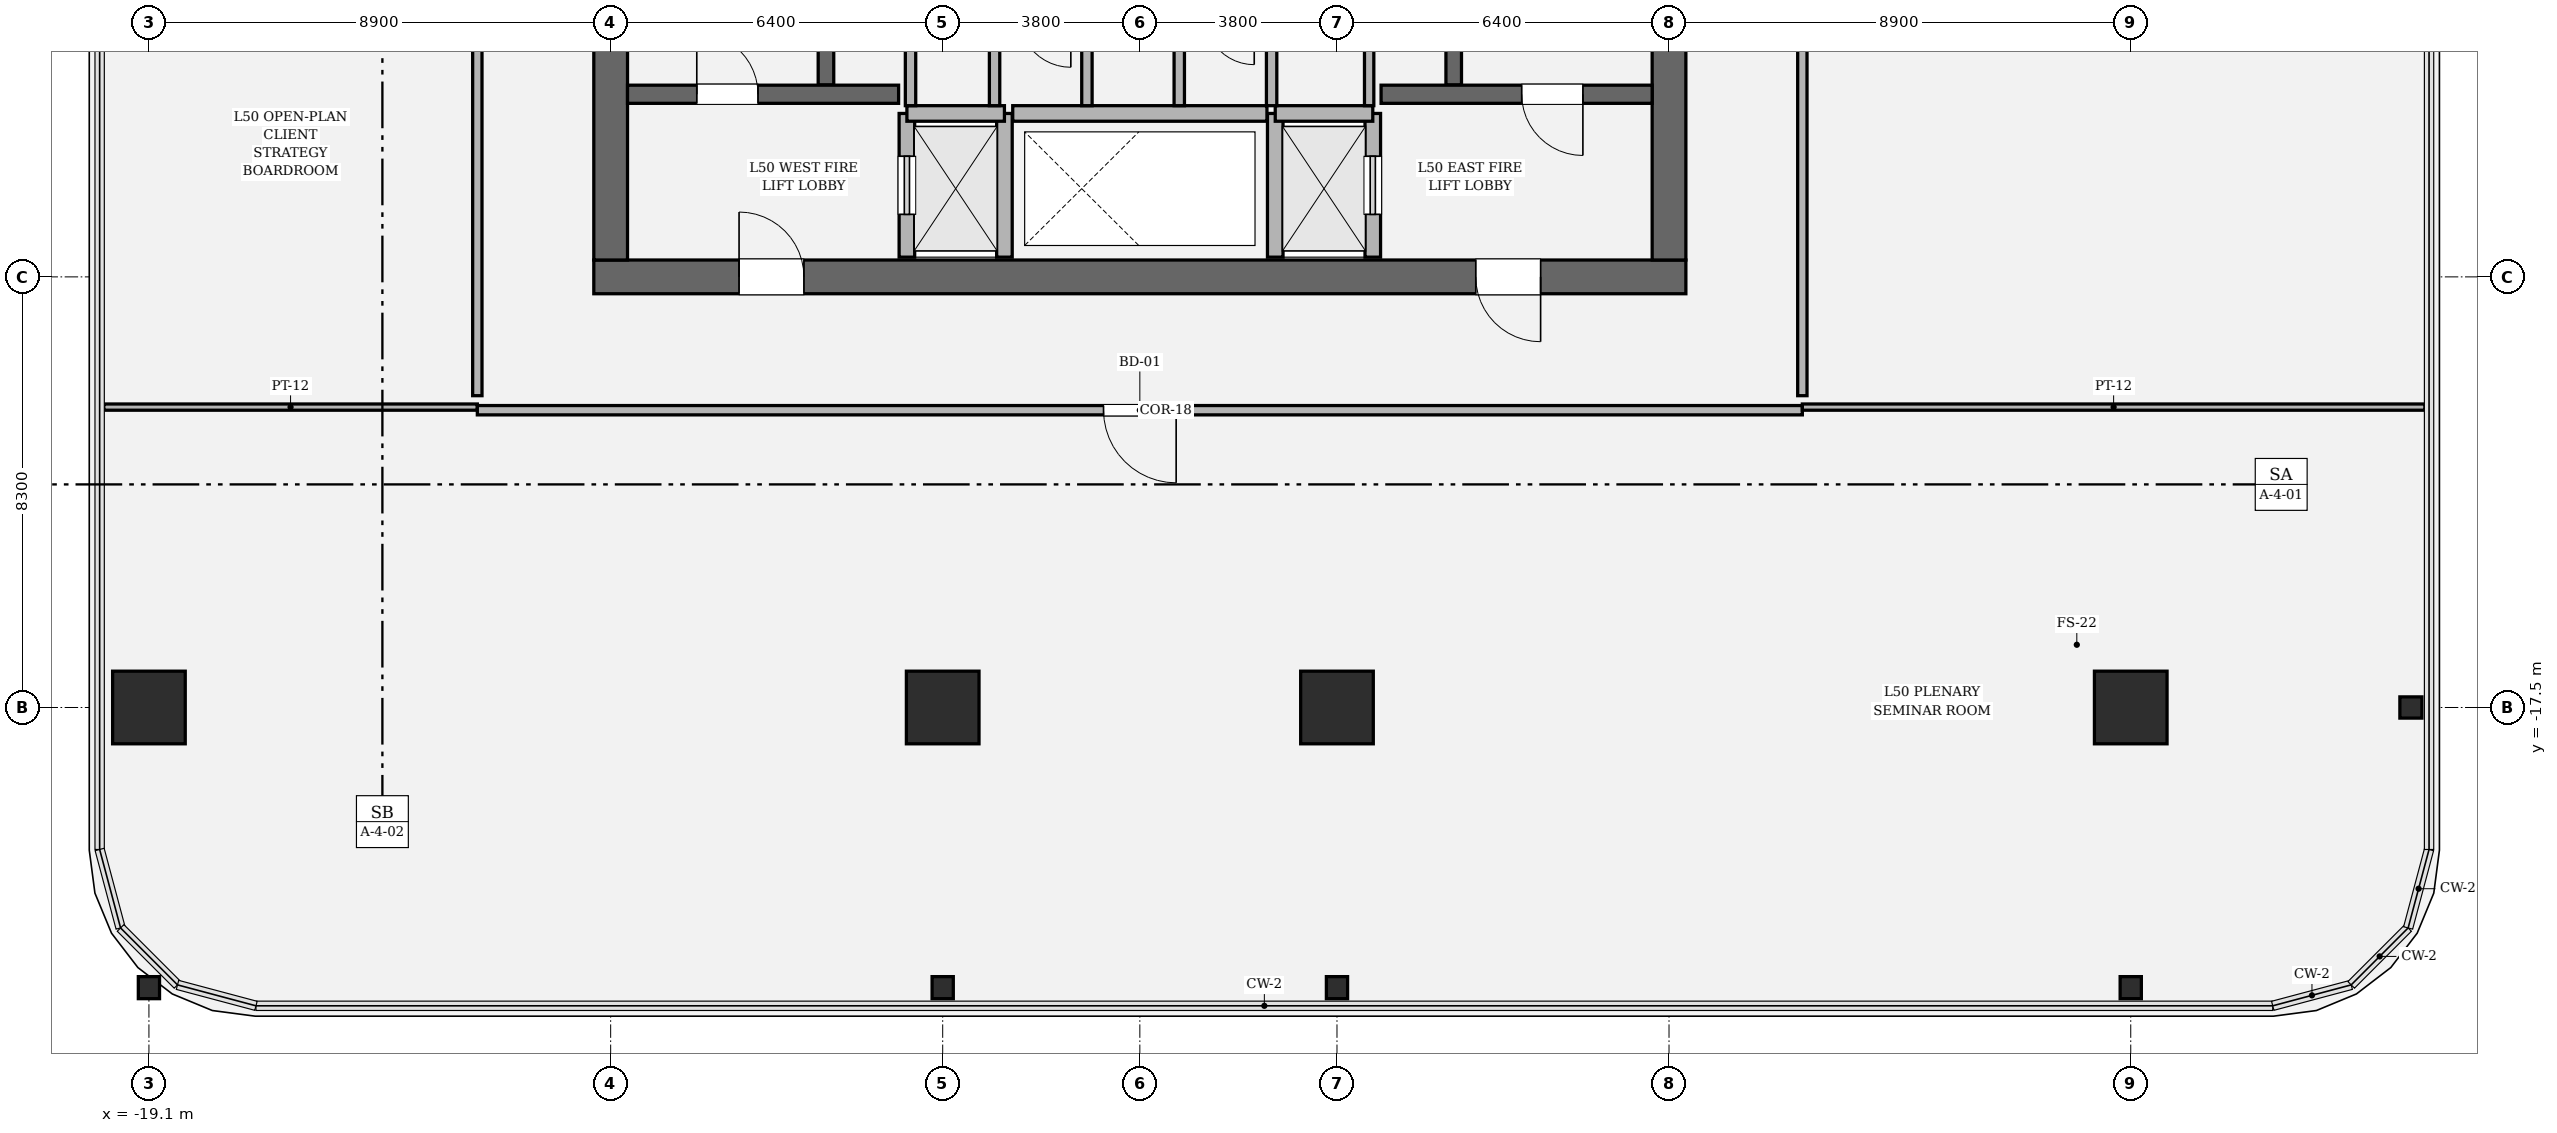
"""IFC4 building model, lengths in metres.
Left out: names, types, materials, properties, quantities, classifications, styles, units other than length and angle.
Written with IfcOpenShell. Run it as: python <this file> out.ifc"""

import sys

from ifc_helpers import new_model, si_unit, direction, frame, frame_2d, origin, origin_2d, place, context, subcontext, project, spatial, rectangle, hollow_rectangle, i_section, extrude, element, fill, save


model = new_model("IFC4")
c1 = context("Model", 3, precision=1e-05, world=origin(), true_north=direction((0.0, 1.0)))
c2 = subcontext(c1, "Body", "Model", "MODEL_VIEW")
j1 = project(units=[si_unit("LENGTHUNIT", "METRE"), si_unit("PLANEANGLEUNIT", "RADIAN")], contexts=[c1])
p1 = place(None, origin())
s1 = spatial("IfcSite", under=j1, at=p1, CompositionType="ELEMENT")
p2 = place(p1, origin())
s2 = spatial("IfcBuilding", under=s1, at=p2, CompositionType="ELEMENT")
p3 = place(p2, frame((0.0, 0.0, 212.7)))
s3 = spatial("IfcBuildingStorey", under=s2, at=p3, CompositionType="ELEMENT", Elevation=212.7)
p4 = place(p3, frame((10.525, -9.2, 0.0), z_axis=(0.0, 0.0, 1.0), x_axis=(-1.0, 0.0, 0.0)))
e1 = element("IfcWall", 1, at=p4, inside=s3, PredefinedType="SHEAR", context=c2, shape_type="SweptSolid", body=[
    extrude(rectangle(XDim=21.05, YDim=0.65, at=frame_2d((10.525, 0.0))), origin(), (0.0, 0.0, 1.0), 4.05),
])
p5 = place(p4, frame((2.8, 0.0, 0.0)))
e2 = element("IfcOpeningElement", 2, at=p5, cuts=e1, PredefinedType="OPENING", context=c2, shape_type="SweptSolid", body=[
    extrude(rectangle(XDim=1.25, YDim=2.25, at=frame_2d((0.625, 1.125))), frame((0.0, 0.335, 0.0), z_axis=(0.0, -1.0, 0.0), x_axis=(1.0, 0.0, 0.0)), (0.0, 0.0, 1.0), 0.67),
])
p6 = place(p4, frame((17.0, 0.0, 0.0)))
e3 = element("IfcOpeningElement", 3, at=p6, cuts=e1, PredefinedType="OPENING", context=c2, shape_type="SweptSolid", body=[
    extrude(rectangle(XDim=1.25, YDim=2.25, at=frame_2d((0.625, 1.125))), frame((0.0, 0.335, 0.0), z_axis=(0.0, -1.0, 0.0), x_axis=(1.0, 0.0, 0.0)), (0.0, 0.0, 1.0), 0.67),
])
p7 = place(p3, frame((-10.2, -8.875, 0.0), z_axis=(0.0, 0.0, 1.0), x_axis=(0.0, 1.0, 0.0)))
e4 = element("IfcWall", 4, at=p7, inside=s3, PredefinedType="SHEAR", context=c2, shape_type="SweptSolid", body=[
    extrude(rectangle(XDim=17.75, YDim=0.65, at=frame_2d((8.875, 0.0))), origin(), (0.0, 0.0, 1.0), 4.05),
])
p8 = place(p7, frame((12.665, 0.0, 0.0)))
e5 = element("IfcOpeningElement", 5, at=p8, cuts=e4, PredefinedType="OPENING", context=c2, shape_type="SweptSolid", body=[
    extrude(rectangle(XDim=1.18, YDim=2.2, at=frame_2d((0.59, 1.1))), frame((0.0, 0.335, 0.0), z_axis=(0.0, -1.0, 0.0), x_axis=(1.0, 0.0, 0.0)), (0.0, 0.0, 1.0), 0.67),
])
p9 = place(p3, frame((10.2, 8.875, 0.0), z_axis=(0.0, 0.0, 1.0), x_axis=(0.0, -1.0, 0.0)))
e6 = element("IfcWall", 6, at=p9, inside=s3, PredefinedType="SHEAR", context=c2, shape_type="SweptSolid", body=[
    extrude(rectangle(XDim=17.75, YDim=0.65, at=frame_2d((8.875, 0.0))), origin(), (0.0, 0.0, 1.0), 4.05),
])
p10 = place(p9, frame((3.905, 0.0, 0.0)))
e7 = element("IfcOpeningElement", 7, at=p10, cuts=e6, PredefinedType="OPENING", context=c2, shape_type="SweptSolid", body=[
    extrude(rectangle(XDim=1.18, YDim=2.2, at=frame_2d((0.59, 1.1))), frame((0.0, 0.335, 0.0), z_axis=(0.0, -1.0, 0.0), x_axis=(1.0, 0.0, 0.0)), (0.0, 0.0, 1.0), 0.67),
])
for number, where, z_axis, x_axis in (
    (8, (-6.05, -5.5, 0.0), (0.0, 0.0, 1.0), (0.0, 1.0, 0.0)),
    (9, (6.05, 3.45, 0.0), (0.0, 0.0, 1.0), (0.0, -1.0, 0.0)),
):
    element("IfcWall", number, at=place(p3, frame(where, z_axis=z_axis, x_axis=x_axis)), inside=s3, PredefinedType="SOLIDWALL", context=c2, shape_type="SweptSolid", body=[
        extrude(rectangle(XDim=8.95, YDim=0.3, at=frame_2d((4.475, 0.0))), origin(), (0.0, 0.0, 1.0), 4.05),
    ])
p11 = place(p3, frame((-9.875, -5.68, 0.0), z_axis=(0.0, 0.0, 1.0), x_axis=(1.0, 0.0, 0.0)))
e10 = element("IfcWall", 10, at=p11, inside=s3, PredefinedType="SOLIDWALL", context=c2, shape_type="SweptSolid", body=[
    extrude(rectangle(XDim=5.225, YDim=0.35, at=frame_2d((2.613, 0.0))), origin(), (0.0, 0.0, 1.0), 4.05),
])
p12 = place(p11, frame((1.335, 0.0, 0.0)))
e11 = element("IfcOpeningElement", 11, at=p12, cuts=e10, PredefinedType="OPENING", context=c2, shape_type="SweptSolid", body=[
    extrude(rectangle(XDim=1.18, YDim=2.2, at=frame_2d((0.59, 1.1))), frame((0.0, 0.185, 0.0), z_axis=(0.0, -1.0, 0.0), x_axis=(1.0, 0.0, 0.0)), (0.0, 0.0, 1.0), 0.37),
])
p13 = place(p3, frame((4.65, -5.68, 0.0), z_axis=(0.0, 0.0, 1.0), x_axis=(1.0, 0.0, 0.0)))
e12 = element("IfcWall", 12, at=p13, inside=s3, PredefinedType="SOLIDWALL", context=c2, shape_type="SweptSolid", body=[
    extrude(rectangle(XDim=5.225, YDim=0.35, at=frame_2d((2.613, 0.0))), origin(), (0.0, 0.0, 1.0), 4.05),
])
p14 = place(p13, frame((2.71, 0.0, 0.0)))
e13 = element("IfcOpeningElement", 13, at=p14, cuts=e12, PredefinedType="OPENING", context=c2, shape_type="SweptSolid", body=[
    extrude(rectangle(XDim=1.18, YDim=2.2, at=frame_2d((0.59, 1.1))), frame((0.0, 0.185, 0.0), z_axis=(0.0, -1.0, 0.0), x_axis=(1.0, 0.0, 0.0)), (0.0, 0.0, 1.0), 0.37),
])
for number, where, z_axis, x_axis in (
    (14, (-19.1, -17.5, 0.0), (0.0, 0.0, 1.0), (1.0, 0.0, 0.0)),
    (15, (-3.8, -17.5, 0.0), (0.0, 0.0, 1.0), (1.0, 0.0, 0.0)),
    (16, (3.8, -17.5, 0.0), (0.0, 0.0, 1.0), (1.0, 0.0, 0.0)),
    (17, (19.1, -17.5, 0.0), (0.0, 0.0, 1.0), (1.0, 0.0, 0.0)),
):
    element("IfcColumn", number, at=place(p3, frame(where, z_axis=z_axis, x_axis=x_axis)), inside=s3, PredefinedType="COLUMN", context=c2, shape_type="SweptSolid", body=[
        extrude(hollow_rectangle(XDim=1.4, YDim=1.4, WallThickness=0.042, at=origin_2d()), origin(), (0.0, 0.0, 1.0), 4.05),
    ])
for number, where, z_axis, x_axis in (
    (18, (-19.1, -22.9, 0.0), (0.0, 0.0, 1.0), (1.0, 0.0, 0.0)),
    (19, (-3.8, -22.9, 0.0), (0.0, 0.0, 1.0), (1.0, 0.0, 0.0)),
    (20, (3.8, -22.9, 0.0), (0.0, 0.0, 1.0), (1.0, 0.0, 0.0)),
    (21, (19.1, -22.9, 0.0), (0.0, 0.0, 1.0), (1.0, 0.0, 0.0)),
    (22, (24.5, -17.5, 0.0), (0.0, 0.0, 1.0), (0.0, 1.0, 0.0)),
):
    element("IfcColumn", number, at=place(p3, frame(where, z_axis=z_axis, x_axis=x_axis)), inside=s3, PredefinedType="COLUMN", context=c2, shape_type="SweptSolid", body=[
        extrude(i_section(OverallWidth=0.409, OverallDepth=0.425, WebThickness=0.032, FlangeThickness=0.052, FilletRadius=0.018, at=origin_2d()), origin(), (0.0, 0.0, 1.0), 4.048),
    ])
p15 = place(p3, frame((-4.49, -8.82, 0.0), z_axis=(0.0, 0.0, 1.0), x_axis=(0.0, 1.0, 0.0)))
e23 = element("IfcWall", 23, at=p15, inside=s3, PredefinedType="SOLIDWALL", context=c2, shape_type="SweptSolid", body=[
    extrude(rectangle(XDim=2.77, YDim=0.3, at=frame_2d((1.385, 0.0))), origin(), (0.0, 0.0, 1.0), 3.83),
])
p16 = place(p15, frame((0.825, 0.0, 0.0)))
e24 = element("IfcOpeningElement", 24, at=p16, cuts=e23, PredefinedType="OPENING", context=c2, shape_type="SweptSolid", body=[
    extrude(rectangle(XDim=1.12, YDim=2.25, at=frame_2d((0.56, 1.125))), frame((0.0, 0.16, 0.0), z_axis=(0.0, -1.0, 0.0), x_axis=(1.0, 0.0, 0.0)), (0.0, 0.0, 1.0), 0.32),
])
p17 = place(p3, frame((-2.61, -8.82, 0.0), z_axis=(0.0, 0.0, 1.0), x_axis=(0.0, 1.0, 0.0)))
e25 = element("IfcWall", 25, at=p17, inside=s3, PredefinedType="SOLIDWALL", context=c2, shape_type="SweptSolid", body=[
    extrude(rectangle(XDim=2.77, YDim=0.3, at=frame_2d((1.385, 0.0))), origin(), (0.0, 0.0, 1.0), 3.83),
])
p18 = place(p3, frame((-4.49, -6.05, 0.0), z_axis=(0.0, 0.0, 1.0), x_axis=(1.0, 0.0, 0.0)))
e26 = element("IfcWall", 26, at=p18, inside=s3, PredefinedType="SOLIDWALL", context=c2, shape_type="SweptSolid", body=[
    extrude(rectangle(XDim=1.88, YDim=0.3, at=frame_2d((0.94, 0.0))), origin(), (0.0, 0.0, 1.0), 3.83),
])
p19 = place(p3, frame((4.49, -8.82, 0.0), z_axis=(0.0, 0.0, 1.0), x_axis=(0.0, 1.0, 0.0)))
e27 = element("IfcWall", 27, at=p19, inside=s3, PredefinedType="SOLIDWALL", context=c2, shape_type="SweptSolid", body=[
    extrude(rectangle(XDim=2.77, YDim=0.3, at=frame_2d((1.385, 0.0))), origin(), (0.0, 0.0, 1.0), 3.83),
])
p20 = place(p19, frame((0.825, 0.0, 0.0)))
e28 = element("IfcOpeningElement", 28, at=p20, cuts=e27, PredefinedType="OPENING", context=c2, shape_type="SweptSolid", body=[
    extrude(rectangle(XDim=1.12, YDim=2.25, at=frame_2d((0.56, 1.125))), frame((0.0, 0.16, 0.0), z_axis=(0.0, -1.0, 0.0), x_axis=(1.0, 0.0, 0.0)), (0.0, 0.0, 1.0), 0.32),
])
p21 = place(p3, frame((2.61, -8.82, 0.0), z_axis=(0.0, 0.0, 1.0), x_axis=(0.0, 1.0, 0.0)))
e29 = element("IfcWall", 29, at=p21, inside=s3, PredefinedType="SOLIDWALL", context=c2, shape_type="SweptSolid", body=[
    extrude(rectangle(XDim=2.77, YDim=0.3, at=frame_2d((1.385, 0.0))), origin(), (0.0, 0.0, 1.0), 3.83),
])
p22 = place(p3, frame((2.61, -6.05, 0.0), z_axis=(0.0, 0.0, 1.0), x_axis=(1.0, 0.0, 0.0)))
e30 = element("IfcWall", 30, at=p22, inside=s3, PredefinedType="SOLIDWALL", context=c2, shape_type="SweptSolid", body=[
    extrude(rectangle(XDim=1.88, YDim=0.3, at=frame_2d((0.94, 0.0))), origin(), (0.0, 0.0, 1.0), 3.83),
])
p23 = place(p3, frame((-2.45, -6.05, 0.0), z_axis=(0.0, 0.0, 1.0), x_axis=(1.0, 0.0, 0.0)))
e31 = element("IfcWall", 31, at=p23, inside=s3, PredefinedType="SOLIDWALL", context=c2, shape_type="SweptSolid", body=[
    extrude(rectangle(XDim=4.9, YDim=0.3, at=frame_2d((2.45, 0.0))), origin(), (0.0, 0.0, 1.0), 3.83),
])
for number, where, z_axis, x_axis in (
    (32, (-2.8, -5.9, 0.0), (0.0, 0.0, 1.0), (0.0, 1.0, 0.0)),
    (33, (-4.42, -4.16, 0.0), (0.0, 0.0, 1.0), (0.0, -1.0, 0.0)),
    (34, (-1.02, -5.9, 0.0), (0.0, 0.0, 1.0), (0.0, 1.0, 0.0)),
    (35, (0.76, -5.9, 0.0), (0.0, 0.0, 1.0), (0.0, 1.0, 0.0)),
    (36, (2.54, -5.9, 0.0), (0.0, 0.0, 1.0), (0.0, 1.0, 0.0)),
):
    element("IfcWall", number, at=place(p3, frame(where, z_axis=z_axis, x_axis=x_axis)), inside=s3, PredefinedType="SOLIDWALL", context=c2, shape_type="SweptSolid", body=[
        extrude(rectangle(XDim=1.74, YDim=0.2, at=frame_2d((0.87, 0.0))), origin(), (0.0, 0.0, 1.0), 3.83),
    ])
p24 = place(p3, frame((4.42, -5.9, 0.0), z_axis=(0.0, 0.0, 1.0), x_axis=(0.0, 1.0, 0.0)))
e37 = element("IfcWall", 37, at=p24, inside=s3, PredefinedType="PARTITIONING", context=c2, shape_type="SweptSolid", body=[
    extrude(rectangle(XDim=1.74, YDim=0.18, at=frame_2d((0.87, 0.0))), origin(), (0.0, 0.0, 1.0), 3.83),
])
p25 = place(p3, frame((-19.97, -11.71, 0.0), z_axis=(0.0, 0.0, 1.0), x_axis=(1.0, 0.0, 0.0)))
e38 = element("IfcWall", 38, at=p25, inside=s3, PredefinedType="PARTITIONING", context=c2, shape_type="SweptSolid", body=[
    extrude(rectangle(XDim=7.2, YDim=0.12, at=frame_2d((3.6, 0.0))), origin(), (0.0, 0.0, 1.0), 3.174),
])
p26 = place(p3, frame((-12.77, -11.77, 0.0), z_axis=(0.0, 0.0, 1.0), x_axis=(1.0, 0.0, 0.0)))
e39 = element("IfcWall", 39, at=p26, inside=s3, PredefinedType="PARTITIONING", context=c2, shape_type="SweptSolid", body=[
    extrude(rectangle(XDim=25.54, YDim=0.18, at=frame_2d((12.77, 0.0))), origin(), (0.0, 0.0, 1.0), 3.174),
])
p27 = place(p26, frame((12.07, 0.0, 0.0)))
e40 = element("IfcOpeningElement", 40, at=p27, cuts=e39, PredefinedType="OPENING", context=c2, shape_type="SweptSolid", body=[
    extrude(rectangle(XDim=1.4, YDim=2.25, at=frame_2d((0.7, 1.125))), frame((0.0, 0.1, 0.0), z_axis=(0.0, -1.0, 0.0), x_axis=(1.0, 0.0, 0.0)), (0.0, 0.0, 1.0), 0.2),
])
p28 = place(p3, frame((12.77, -11.71, 0.0), z_axis=(0.0, 0.0, 1.0), x_axis=(1.0, 0.0, 0.0)))
e41 = element("IfcWall", 41, at=p28, inside=s3, PredefinedType="PARTITIONING", context=c2, shape_type="SweptSolid", body=[
    extrude(rectangle(XDim=12.0, YDim=0.12, at=frame_2d((6.0, 0.0))), origin(), (0.0, 0.0, 1.0), 2.544),
])
p29 = place(p3, frame((-12.77, -1.2, 0.0), z_axis=(0.0, 0.0, 1.0), x_axis=(0.0, -1.0, 0.0)))
e42 = element("IfcWall", 42, at=p29, inside=s3, PredefinedType="PARTITIONING", context=c2, shape_type="SweptSolid", body=[
    extrude(rectangle(XDim=10.29, YDim=0.18, at=frame_2d((5.145, 0.0))), origin(), (0.0, 0.0, 1.0), 3.174),
])
p30 = place(p3, frame((12.77, -11.49, 0.0), z_axis=(0.0, 0.0, 1.0), x_axis=(0.0, 1.0, 0.0)))
e43 = element("IfcWall", 43, at=p30, inside=s3, PredefinedType="PARTITIONING", context=c2, shape_type="SweptSolid", body=[
    extrude(rectangle(XDim=29.86, YDim=0.18, at=frame_2d((14.93, 0.0))), origin(), (0.0, 0.0, 1.0), 3.174),
])
p31 = place(p30, frame((14.23, 0.0, 0.0)))
e44 = element("IfcOpeningElement", 44, at=p31, cuts=e43, PredefinedType="OPENING", context=c2, shape_type="SweptSolid", body=[
    extrude(rectangle(XDim=1.4, YDim=2.25, at=frame_2d((0.7, 1.125))), frame((0.0, 0.1, 0.0), z_axis=(0.0, -1.0, 0.0), x_axis=(1.0, 0.0, 0.0)), (0.0, 0.0, 1.0), 0.2),
])
p32 = place(p12, origin())
e45 = element("IfcDoor", 45, at=p32, inside=s3, OperationType="SINGLE_SWING_LEFT", PredefinedType="DOOR", context=c2, shape_type="SweptSolid", body=[
    extrude(rectangle(XDim=1.18, YDim=2.2, at=frame_2d((0.59, 1.1))), frame((0.0, 0.025, 0.0), z_axis=(0.0, -1.0, 0.0), x_axis=(1.0, 0.0, 0.0)), (0.0, 0.0, 1.0), 0.05),
])
fill(e11, e45)
p33 = place(p14, origin())
e46 = element("IfcDoor", 46, at=p33, inside=s3, OperationType="SINGLE_SWING_RIGHT", PredefinedType="DOOR", context=c2, shape_type="SweptSolid", body=[
    extrude(rectangle(XDim=1.18, YDim=2.2, at=frame_2d((0.59, 1.1))), frame((0.0, 0.025, 0.0), z_axis=(0.0, -1.0, 0.0), x_axis=(1.0, 0.0, 0.0)), (0.0, 0.0, 1.0), 0.05),
])
fill(e13, e46)
p34 = place(p5, origin())
e47 = element("IfcDoor", 47, at=p34, inside=s3, OperationType="SINGLE_SWING_LEFT", PredefinedType="DOOR", context=c2, shape_type="SweptSolid", body=[
    extrude(rectangle(XDim=1.25, YDim=2.25, at=frame_2d((0.625, 1.125))), frame((0.0, 0.025, 0.0), z_axis=(0.0, -1.0, 0.0), x_axis=(1.0, 0.0, 0.0)), (0.0, 0.0, 1.0), 0.05),
])
fill(e2, e47)
p35 = place(p6, origin())
e48 = element("IfcDoor", 48, at=p35, inside=s3, OperationType="SINGLE_SWING_RIGHT", PredefinedType="DOOR", context=c2, shape_type="SweptSolid", body=[
    extrude(rectangle(XDim=1.25, YDim=2.25, at=frame_2d((0.625, 1.125))), frame((0.0, 0.025, 0.0), z_axis=(0.0, -1.0, 0.0), x_axis=(1.0, 0.0, 0.0)), (0.0, 0.0, 1.0), 0.05),
])
fill(e3, e48)
p36 = place(p16, origin())
e49 = element("IfcDoor", 49, at=p36, inside=s3, OperationType="SLIDING_TO_LEFT", PredefinedType="DOOR", context=c2, shape_type="SweptSolid", body=[
    extrude(rectangle(XDim=1.12, YDim=2.25, at=frame_2d((0.56, 1.125))), frame((0.0, 0.025, 0.0), z_axis=(0.0, -1.0, 0.0), x_axis=(1.0, 0.0, 0.0)), (0.0, 0.0, 1.0), 0.05),
])
fill(e24, e49)
p37 = place(p20, origin())
e50 = element("IfcDoor", 50, at=p37, inside=s3, OperationType="SLIDING_TO_RIGHT", PredefinedType="DOOR", context=c2, shape_type="SweptSolid", body=[
    extrude(rectangle(XDim=1.12, YDim=2.25, at=frame_2d((0.56, 1.125))), frame((0.0, 0.025, 0.0), z_axis=(0.0, -1.0, 0.0), x_axis=(1.0, 0.0, 0.0)), (0.0, 0.0, 1.0), 0.05),
])
fill(e28, e50)
p38 = place(p27, origin())
e51 = element("IfcDoor", 51, at=p38, inside=s3, OperationType="SINGLE_SWING_RIGHT", PredefinedType="DOOR", context=c2, shape_type="SweptSolid", body=[
    extrude(rectangle(XDim=1.4, YDim=2.25, at=frame_2d((0.7, 1.125))), frame((0.0, 0.025, 0.0), z_axis=(0.0, -1.0, 0.0), x_axis=(1.0, 0.0, 0.0)), (0.0, 0.0, 1.0), 0.05),
])
fill(e40, e51)
save(model, sys.argv[1])
